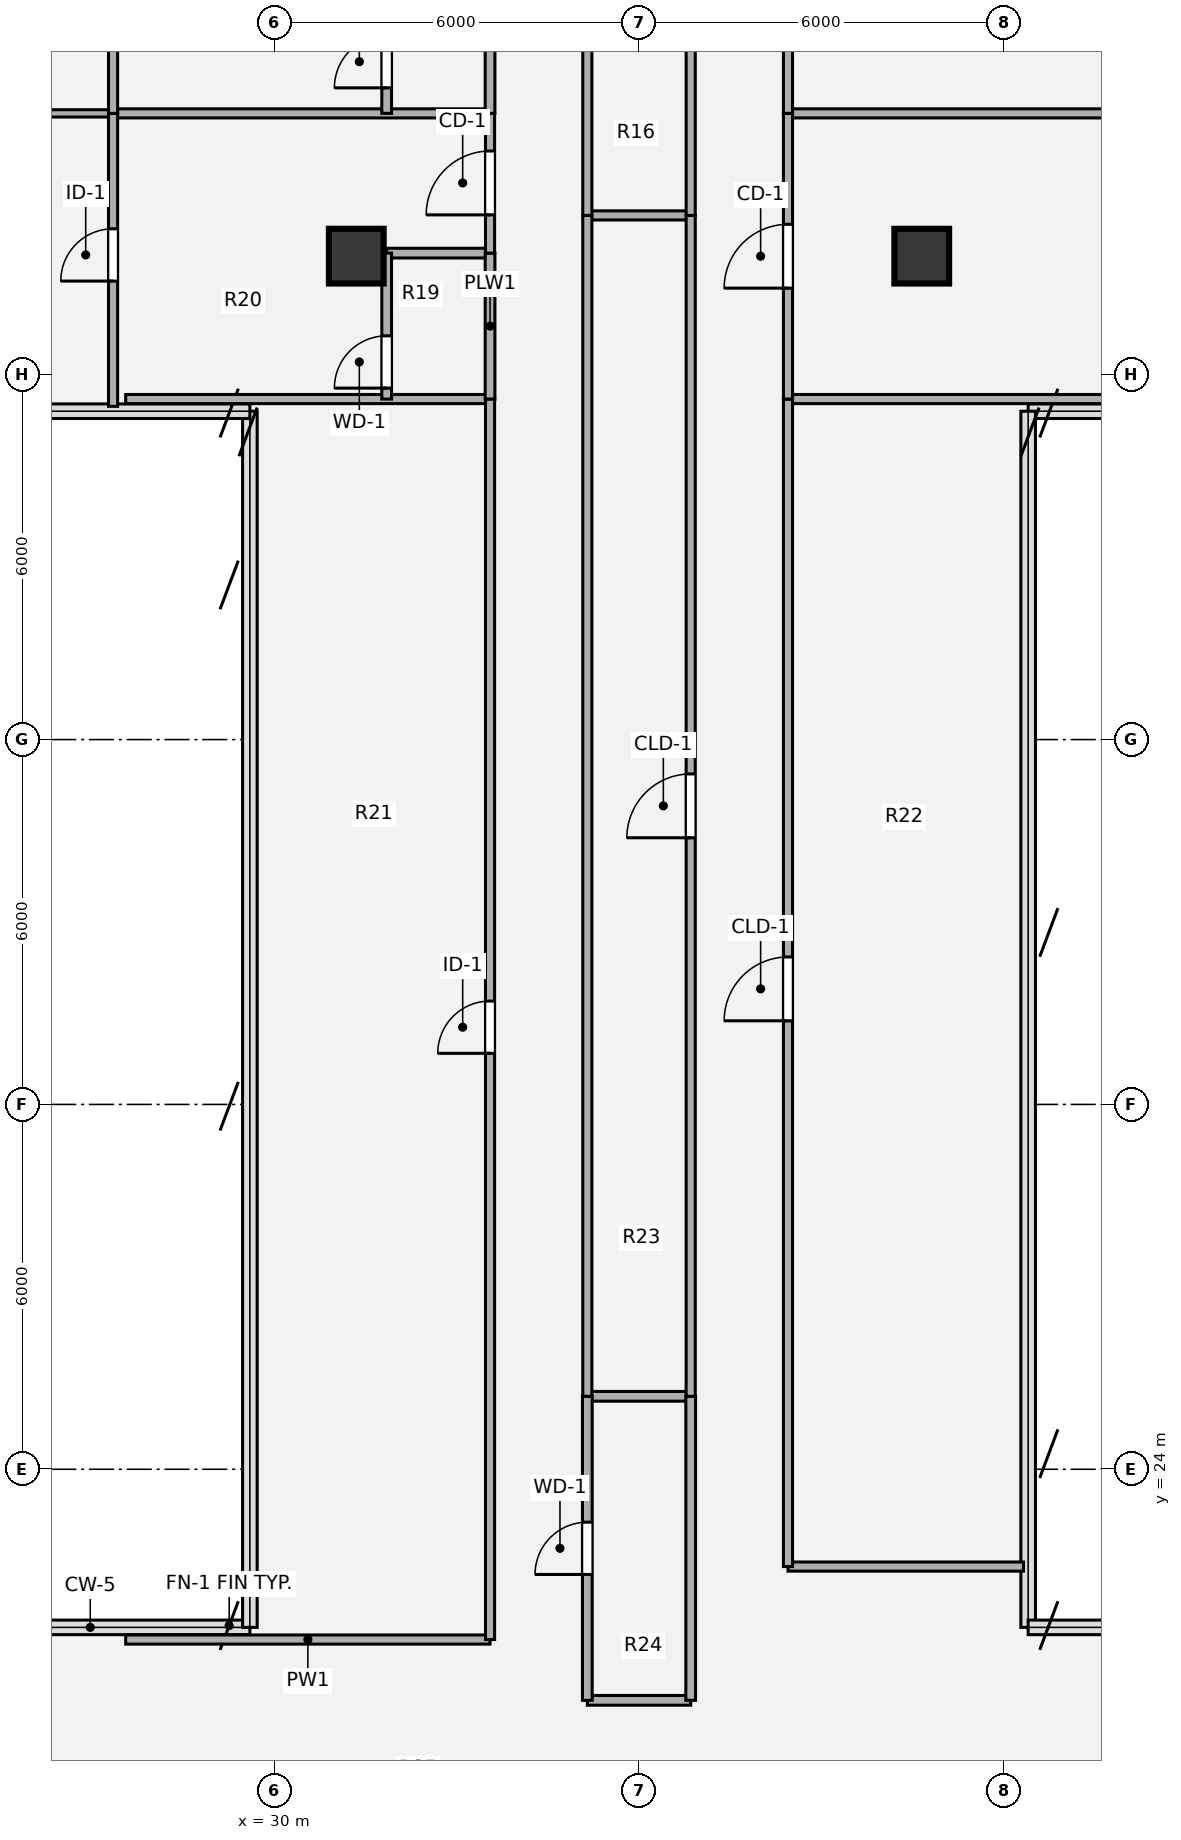
"""IFC4 building model, lengths in metres.
Left out: names, types, materials, properties, quantities, classifications, styles, units other than length and angle.
Written with IfcOpenShell. Run it as: python <this file> out.ifc"""

import sys

from ifc_helpers import new_model, si_unit, direction, frame, frame_2d, origin, origin_2d, place, context, subcontext, project, spatial, rectangle, hollow_circle, extrude, source, transform, mapped, element, fill, save


model = new_model("IFC4")
c1 = context("Model", 3, precision=1e-05, world=origin(), true_north=direction((0.0, 1.0)))
c2 = subcontext(c1, "Body", "Model", "MODEL_VIEW")
j1 = project(units=[si_unit("LENGTHUNIT", "METRE"), si_unit("PLANEANGLEUNIT", "RADIAN")], contexts=[c1])
p1 = place(None, origin())
s1 = spatial("IfcSite", under=j1, at=p1, CompositionType="ELEMENT")
p2 = place(p1, origin())
s2 = spatial("IfcBuilding", under=s1, at=p2, CompositionType="ELEMENT")
p3 = place(p2, frame((0.0, 0.0, 264.6)))
s3 = spatial("IfcBuildingStorey", under=s2, at=p3, CompositionType="ELEMENT", Elevation=264.6)
m1 = source(origin(), c2, "Body", "SweptSolid", [
    extrude(hollow_circle(Radius=0.45, WallThickness=0.032, at=origin_2d()), origin(), (0.0, 0.0, 1.0), 3.78),
])
for number, where, z_axis, x_axis in (
    (1, (31.35, 43.95, 0.0), (0.0, 0.0, 1.0), (1.0, 0.0, 0.0)),
    (2, (40.65, 43.95, 0.0), (0.0, 0.0, 1.0), (1.0, 0.0, 0.0)),
):
    element("IfcColumn", number, at=place(p3, frame(where, z_axis=z_axis, x_axis=x_axis)), inside=s3, PredefinedType="COLUMN", context=c2, shape_type="MappedRepresentation", body=[
        mapped(m1, transform((0.0, 0.0, 0.0), x_axis=(1.0, 0.0, 0.0), y_axis=(0.0, 1.0, 0.0), z_axis=(0.0, 0.0, 1.0), scale=1.0)),
    ])
p4 = place(p3, frame((35.15, 20.2, 0.0), z_axis=(0.0, 0.0, 1.0), x_axis=(1.0, 0.0, 0.0)))
e3 = element("IfcWall", 3, at=p4, inside=s3, PredefinedType="PLUMBINGWALL", context=c2, shape_type="SweptSolid", body=[
    extrude(rectangle(XDim=1.7, YDim=0.16, at=frame_2d((0.85, 0.0))), origin(), (0.0, 0.0, 1.0), 3.5),
])
p5 = place(p3, frame((27.558, 21.2, 0.0), z_axis=(0.0, 0.0, 1.0), x_axis=(1.0, 0.0, 0.0)))
e4 = element("IfcWall", 4, at=p5, inside=s3, PredefinedType="PARTITIONING", context=c2, shape_type="SweptSolid", body=[
    extrude(rectangle(XDim=5.992, YDim=0.15, at=frame_2d((2.996, 0.0))), origin(), (0.0, 0.0, 1.0), 3.5),
])
p6 = place(p3, frame((38.45, 22.4, 0.0), z_axis=(0.0, 0.0, 1.0), x_axis=(1.0, 0.0, 0.0)))
e5 = element("IfcWall", 5, at=p6, inside=s3, PredefinedType="PARTITIONING", context=c2, shape_type="SweptSolid", body=[
    extrude(rectangle(XDim=3.873, YDim=0.15, at=frame_2d((1.937, 0.0))), origin(), (0.0, 0.0, 1.0), 3.5),
])
p7 = place(p3, frame((35.15, 25.2, 0.0), z_axis=(0.0, 0.0, 1.0), x_axis=(1.0, 0.0, 0.0)))
e6 = element("IfcWall", 6, at=p7, inside=s3, PredefinedType="PLUMBINGWALL", context=c2, shape_type="SweptSolid", body=[
    extrude(rectangle(XDim=1.7, YDim=0.16, at=frame_2d((0.85, 0.0))), origin(), (0.0, 0.0, 1.0), 3.5),
])
p8 = place(p3, frame((27.558, 41.6, 0.0), z_axis=(0.0, 0.0, 1.0), x_axis=(1.0, 0.0, 0.0)))
e7 = element("IfcWall", 7, at=p8, inside=s3, PredefinedType="PARTITIONING", context=c2, shape_type="SweptSolid", body=[
    extrude(rectangle(XDim=5.992, YDim=0.15, at=frame_2d((2.996, 0.0))), origin(), (0.0, 0.0, 1.0), 3.5),
])
p9 = place(p3, frame((38.45, 41.6, 0.0), z_axis=(0.0, 0.0, 1.0), x_axis=(1.0, 0.0, 0.0)))
e8 = element("IfcWall", 8, at=p9, inside=s3, PredefinedType="PARTITIONING", context=c2, shape_type="SweptSolid", body=[
    extrude(rectangle(XDim=5.993, YDim=0.15, at=frame_2d((2.997, 0.0))), origin(), (0.0, 0.0, 1.0), 3.5),
])
p10 = place(p3, frame((31.85, 44.0, 0.0), z_axis=(0.0, 0.0, 1.0), x_axis=(1.0, 0.0, 0.0)))
e9 = element("IfcWall", 9, at=p10, inside=s3, PredefinedType="PLUMBINGWALL", context=c2, shape_type="SweptSolid", body=[
    extrude(rectangle(XDim=1.7, YDim=0.16, at=frame_2d((0.85, 0.0))), origin(), (0.0, 0.0, 1.0), 2.903),
])
p11 = place(p3, frame((35.15, 44.62, 0.0), z_axis=(0.0, 0.0, 1.0), x_axis=(1.0, 0.0, 0.0)))
e10 = element("IfcWall", 10, at=p11, inside=s3, PredefinedType="PARTITIONING", context=c2, shape_type="SweptSolid", body=[
    extrude(rectangle(XDim=1.7, YDim=0.15, at=frame_2d((0.85, 0.0))), origin(), (0.0, 0.0, 1.0), 3.259),
])
p12 = place(p3, frame((17.78, 46.298, 0.0), z_axis=(0.0, 0.0, 1.0), x_axis=(1.0, 0.0, 0.0)))
e11 = element("IfcWall", 11, at=p12, inside=s3, PredefinedType="PARTITIONING", context=c2, shape_type="SweptSolid", body=[
    extrude(rectangle(XDim=9.57, YDim=0.12, at=frame_2d((4.785, 0.0))), origin(), (0.0, 0.0, 1.0), 3.055),
])
p13 = place(p3, frame((27.35, 46.298, 0.0), z_axis=(0.0, 0.0, 1.0), x_axis=(1.0, 0.0, 0.0)))
e12 = element("IfcWall", 12, at=p13, inside=s3, PredefinedType="PARTITIONING", context=c2, shape_type="SweptSolid", body=[
    extrude(rectangle(XDim=6.2, YDim=0.15, at=frame_2d((3.1, 0.0))), origin(), (0.0, 0.0, 1.0), 3.055),
])
p14 = place(p3, frame((38.45, 46.298, 0.0), z_axis=(0.0, 0.0, 1.0), x_axis=(1.0, 0.0, 0.0)))
e13 = element("IfcWall", 13, at=p14, inside=s3, PredefinedType="PARTITIONING", context=c2, shape_type="SweptSolid", body=[
    extrude(rectangle(XDim=15.77, YDim=0.15, at=frame_2d((7.885, 0.0))), origin(), (0.0, 0.0, 1.0), 3.055),
])
p15 = place(p3, frame((27.35, 41.48, 0.0), z_axis=(0.0, 0.0, 1.0), x_axis=(0.0, 1.0, 0.0)))
e14 = element("IfcWall", 14, at=p15, inside=s3, PredefinedType="PARTITIONING", context=c2, shape_type="SweptSolid", body=[
    extrude(rectangle(XDim=4.818, YDim=0.15, at=frame_2d((2.409, 0.0))), origin(), (0.0, 0.0, 1.0), 3.5),
])
p16 = place(p15, frame((2.06, 0.0, 0.0)))
e15 = element("IfcOpeningElement", 15, at=p16, cuts=e14, PredefinedType="OPENING", context=c2, shape_type="SweptSolid", body=[
    extrude(rectangle(XDim=0.86, YDim=2.1, at=origin_2d()), frame((0.43, 0.085, 1.05), z_axis=(0.0, -1.0, 0.0), x_axis=(1.0, 0.0, 0.0)), (0.0, 0.0, 1.0), 0.17),
])
p17 = place(p3, frame((27.35, 46.298, 0.0), z_axis=(0.0, 0.0, 1.0), x_axis=(0.0, 1.0, 0.0)))
e16 = element("IfcWall", 16, at=p17, inside=s3, PredefinedType="PARTITIONING", context=c2, shape_type="SweptSolid", body=[
    extrude(rectangle(XDim=4.524, YDim=0.15, at=frame_2d((2.262, 0.0))), origin(), (0.0, 0.0, 1.0), 3.5),
])
p18 = place(p17, frame((1.742, 0.0, 0.0)))
e17 = element("IfcOpeningElement", 17, at=p18, cuts=e16, PredefinedType="OPENING", context=c2, shape_type="SweptSolid", body=[
    extrude(rectangle(XDim=0.86, YDim=2.1, at=origin_2d()), frame((0.43, 0.085, 1.05), z_axis=(0.0, -1.0, 0.0), x_axis=(1.0, 0.0, 0.0)), (0.0, 0.0, 1.0), 0.17),
])
p19 = place(p3, frame((31.85, 41.6, 0.0), z_axis=(0.0, 0.0, 1.0), x_axis=(0.0, 1.0, 0.0)))
e18 = element("IfcWall", 18, at=p19, inside=s3, PredefinedType="PLUMBINGWALL", context=c2, shape_type="SweptSolid", body=[
    extrude(rectangle(XDim=2.4, YDim=0.16, at=frame_2d((1.2, 0.0))), origin(), (0.0, 0.0, 1.0), 3.5),
])
p20 = place(p19, frame((0.18, 0.0, 0.0)))
e19 = element("IfcOpeningElement", 19, at=p20, cuts=e18, PredefinedType="OPENING", context=c2, shape_type="SweptSolid", body=[
    extrude(rectangle(XDim=0.86, YDim=2.1, at=origin_2d()), frame((0.43, 0.09, 1.05), z_axis=(0.0, -1.0, 0.0), x_axis=(1.0, 0.0, 0.0)), (0.0, 0.0, 1.0), 0.18),
])
p21 = place(p3, frame((31.85, 46.298, 0.0), z_axis=(0.0, 0.0, 1.0), x_axis=(0.0, 1.0, 0.0)))
e20 = element("IfcWall", 20, at=p21, inside=s3, PredefinedType="PLUMBINGWALL", context=c2, shape_type="SweptSolid", body=[
    extrude(rectangle(XDim=2.4, YDim=0.16, at=frame_2d((1.2, 0.0))), origin(), (0.0, 0.0, 1.0), 3.5),
])
p22 = place(p21, frame((0.42, 0.0, 0.0)))
e21 = element("IfcOpeningElement", 21, at=p22, cuts=e20, PredefinedType="OPENING", context=c2, shape_type="SweptSolid", body=[
    extrude(rectangle(XDim=0.86, YDim=2.1, at=origin_2d()), frame((0.43, 0.09, 1.05), z_axis=(0.0, -1.0, 0.0), x_axis=(1.0, 0.0, 0.0)), (0.0, 0.0, 1.0), 0.18),
])
p23 = place(p3, frame((33.55, 21.2, 0.0), z_axis=(0.0, 0.0, 1.0), x_axis=(0.0, 1.0, 0.0)))
e22 = element("IfcWall", 22, at=p23, inside=s3, PredefinedType="PARTITIONING", context=c2, shape_type="SweptSolid", body=[
    extrude(rectangle(XDim=20.4, YDim=0.15, at=frame_2d((10.2, 0.0))), origin(), (0.0, 0.0, 1.0), 3.5),
])
p24 = place(p23, frame((9.64, 0.0, 0.0)))
e23 = element("IfcOpeningElement", 23, at=p24, cuts=e22, PredefinedType="OPENING", context=c2, shape_type="SweptSolid", body=[
    extrude(rectangle(XDim=0.86, YDim=2.1, at=origin_2d()), frame((0.43, 0.085, 1.05), z_axis=(0.0, -1.0, 0.0), x_axis=(1.0, 0.0, 0.0)), (0.0, 0.0, 1.0), 0.17),
])
p25 = place(p3, frame((33.55, 41.6, 0.0), z_axis=(0.0, 0.0, 1.0), x_axis=(0.0, 1.0, 0.0)))
e24 = element("IfcWall", 24, at=p25, inside=s3, PredefinedType="PLUMBINGWALL", context=c2, shape_type="SweptSolid", body=[
    extrude(rectangle(XDim=2.4, YDim=0.16, at=frame_2d((1.2, 0.0))), origin(), (0.0, 0.0, 1.0), 3.5),
])
p26 = place(p3, frame((33.55, 44.0, 0.0), z_axis=(0.0, 0.0, 1.0), x_axis=(0.0, 1.0, 0.0)))
e25 = element("IfcWall", 25, at=p26, inside=s3, PredefinedType="PARTITIONING", context=c2, shape_type="SweptSolid", body=[
    extrude(rectangle(XDim=2.298, YDim=0.15, at=frame_2d((1.149, 0.0))), origin(), (0.0, 0.0, 1.0), 3.5),
])
p27 = place(p26, frame((0.629, 0.0, 0.0)))
e26 = element("IfcOpeningElement", 26, at=p27, cuts=e25, PredefinedType="OPENING", context=c2, shape_type="SweptSolid", body=[
    extrude(rectangle(XDim=1.05, YDim=2.1, at=origin_2d()), frame((0.525, 0.085, 1.05), z_axis=(0.0, -1.0, 0.0), x_axis=(1.0, 0.0, 0.0)), (0.0, 0.0, 1.0), 0.17),
])
p28 = place(p3, frame((33.55, 46.298, 0.0), z_axis=(0.0, 0.0, 1.0), x_axis=(0.0, 1.0, 0.0)))
e27 = element("IfcWall", 27, at=p28, inside=s3, PredefinedType="PLUMBINGWALL", context=c2, shape_type="SweptSolid", body=[
    extrude(rectangle(XDim=2.4, YDim=0.16, at=frame_2d((1.2, 0.0))), origin(), (0.0, 0.0, 1.0), 3.5),
])
p29 = place(p3, frame((35.15, 20.2, 0.0), z_axis=(0.0, 0.0, 1.0), x_axis=(0.0, 1.0, 0.0)))
e28 = element("IfcWall", 28, at=p29, inside=s3, PredefinedType="PLUMBINGWALL", context=c2, shape_type="SweptSolid", body=[
    extrude(rectangle(XDim=5.0, YDim=0.16, at=frame_2d((2.5, 0.0))), origin(), (0.0, 0.0, 1.0), 3.5),
])
p30 = place(p29, frame((2.07, 0.0, 0.0)))
e29 = element("IfcOpeningElement", 29, at=p30, cuts=e28, PredefinedType="OPENING", context=c2, shape_type="SweptSolid", body=[
    extrude(rectangle(XDim=0.86, YDim=2.1, at=origin_2d()), frame((0.43, 0.09, 1.05), z_axis=(0.0, -1.0, 0.0), x_axis=(1.0, 0.0, 0.0)), (0.0, 0.0, 1.0), 0.18),
])
p31 = place(p3, frame((35.15, 25.2, 0.0), z_axis=(0.0, 0.0, 1.0), x_axis=(0.0, 1.0, 0.0)))
e30 = element("IfcWall", 30, at=p31, inside=s3, PredefinedType="PARTITIONING", context=c2, shape_type="SweptSolid", body=[
    extrude(rectangle(XDim=19.42, YDim=0.15, at=frame_2d((9.71, 0.0))), origin(), (0.0, 0.0, 1.0), 3.5),
])
p32 = place(p3, frame((35.15, 44.62, 0.0), z_axis=(0.0, 0.0, 1.0), x_axis=(0.0, 1.0, 0.0)))
e31 = element("IfcWall", 31, at=p32, inside=s3, PredefinedType="PARTITIONING", context=c2, shape_type="SweptSolid", body=[
    extrude(rectangle(XDim=12.58, YDim=0.15, at=frame_2d((6.29, 0.0))), origin(), (0.0, 0.0, 1.0), 3.5),
])
p33 = place(p32, frame((5.83, 0.0, 0.0)))
e32 = element("IfcOpeningElement", 32, at=p33, cuts=e31, PredefinedType="OPENING", context=c2, shape_type="SweptSolid", body=[
    extrude(rectangle(XDim=0.86, YDim=2.1, at=origin_2d()), frame((0.43, 0.085, 1.05), z_axis=(0.0, -1.0, 0.0), x_axis=(1.0, 0.0, 0.0)), (0.0, 0.0, 1.0), 0.17),
])
p34 = place(p3, frame((36.85, 20.2, 0.0), z_axis=(0.0, 0.0, 1.0), x_axis=(0.0, 1.0, 0.0)))
e33 = element("IfcWall", 33, at=p34, inside=s3, PredefinedType="PLUMBINGWALL", context=c2, shape_type="SweptSolid", body=[
    extrude(rectangle(XDim=5.0, YDim=0.16, at=frame_2d((2.5, 0.0))), origin(), (0.0, 0.0, 1.0), 3.5),
])
p35 = place(p3, frame((36.85, 25.2, 0.0), z_axis=(0.0, 0.0, 1.0), x_axis=(0.0, 1.0, 0.0)))
e34 = element("IfcWall", 34, at=p35, inside=s3, PredefinedType="PARTITIONING", context=c2, shape_type="SweptSolid", body=[
    extrude(rectangle(XDim=19.42, YDim=0.15, at=frame_2d((9.71, 0.0))), origin(), (0.0, 0.0, 1.0), 3.5),
])
p36 = place(p35, frame((9.185, 0.0, 0.0)))
e35 = element("IfcOpeningElement", 35, at=p36, cuts=e34, PredefinedType="OPENING", context=c2, shape_type="SweptSolid", body=[
    extrude(rectangle(XDim=1.05, YDim=2.1, at=origin_2d()), frame((0.525, 0.085, 1.05), z_axis=(0.0, -1.0, 0.0), x_axis=(1.0, 0.0, 0.0)), (0.0, 0.0, 1.0), 0.17),
])
p37 = place(p3, frame((36.85, 44.62, 0.0), z_axis=(0.0, 0.0, 1.0), x_axis=(0.0, 1.0, 0.0)))
e36 = element("IfcWall", 36, at=p37, inside=s3, PredefinedType="PARTITIONING", context=c2, shape_type="SweptSolid", body=[
    extrude(rectangle(XDim=12.58, YDim=0.15, at=frame_2d((6.29, 0.0))), origin(), (0.0, 0.0, 1.0), 3.5),
])
p38 = place(p3, frame((38.45, 22.4, 0.0), z_axis=(0.0, 0.0, 1.0), x_axis=(0.0, 1.0, 0.0)))
e37 = element("IfcWall", 37, at=p38, inside=s3, PredefinedType="PARTITIONING", context=c2, shape_type="SweptSolid", body=[
    extrude(rectangle(XDim=19.2, YDim=0.15, at=frame_2d((9.6, 0.0))), origin(), (0.0, 0.0, 1.0), 3.5),
])
p39 = place(p38, frame((8.975, 0.0, 0.0)))
e38 = element("IfcOpeningElement", 38, at=p39, cuts=e37, PredefinedType="OPENING", context=c2, shape_type="SweptSolid", body=[
    extrude(rectangle(XDim=1.05, YDim=2.1, at=origin_2d()), frame((0.525, 0.085, 1.05), z_axis=(0.0, -1.0, 0.0), x_axis=(1.0, 0.0, 0.0)), (0.0, 0.0, 1.0), 0.17),
])
p40 = place(p3, frame((38.45, 41.6, 0.0), z_axis=(0.0, 0.0, 1.0), x_axis=(0.0, 1.0, 0.0)))
e39 = element("IfcWall", 39, at=p40, inside=s3, PredefinedType="PARTITIONING", context=c2, shape_type="SweptSolid", body=[
    extrude(rectangle(XDim=4.698, YDim=0.15, at=frame_2d((2.349, 0.0))), origin(), (0.0, 0.0, 1.0), 3.5),
])
p41 = place(p40, frame((1.824, 0.0, 0.0)))
e40 = element("IfcOpeningElement", 40, at=p41, cuts=e39, PredefinedType="OPENING", context=c2, shape_type="SweptSolid", body=[
    extrude(rectangle(XDim=1.05, YDim=2.1, at=origin_2d()), frame((0.525, 0.085, 1.05), z_axis=(0.0, -1.0, 0.0), x_axis=(1.0, 0.0, 0.0)), (0.0, 0.0, 1.0), 0.17),
])
p42 = place(p3, frame((38.45, 46.298, 0.0), z_axis=(0.0, 0.0, 1.0), x_axis=(0.0, 1.0, 0.0)))
e41 = element("IfcWall", 41, at=p42, inside=s3, PredefinedType="PARTITIONING", context=c2, shape_type="SweptSolid", body=[
    extrude(rectangle(XDim=4.524, YDim=0.15, at=frame_2d((2.262, 0.0))), origin(), (0.0, 0.0, 1.0), 3.5),
])
p43 = place(p42, frame((1.737, 0.0, 0.0)))
e42 = element("IfcOpeningElement", 42, at=p43, cuts=e41, PredefinedType="OPENING", context=c2, shape_type="SweptSolid", body=[
    extrude(rectangle(XDim=1.05, YDim=2.1, at=origin_2d()), frame((0.525, 0.085, 1.05), z_axis=(0.0, -1.0, 0.0), x_axis=(1.0, 0.0, 0.0)), (0.0, 0.0, 1.0), 0.17),
])
m2 = source(origin(), c2, "Body", "SweptSolid", [
    extrude(rectangle(XDim=0.86, YDim=2.1, at=origin_2d()), frame((0.43, 0.025, 1.05), z_axis=(0.0, -1.0, 0.0), x_axis=(1.0, 0.0, 0.0)), (0.0, 0.0, 1.0), 0.05),
])
p44 = place(p16, origin())
e43 = element("IfcDoor", 43, at=p44, inside=s3, OperationType="SINGLE_SWING_LEFT", PredefinedType="DOOR", context=c2, shape_type="MappedRepresentation", body=[
    mapped(m2, transform((0.0, 0.0, 0.0), x_axis=(1.0, 0.0, 0.0), y_axis=(0.0, 1.0, 0.0), z_axis=(0.0, 0.0, 1.0), scale=1.0)),
])
fill(e15, e43)
m3 = source(origin(), c2, "Body", "SweptSolid", [
    extrude(rectangle(XDim=0.86, YDim=2.1, at=origin_2d()), frame((0.43, 0.025, 1.05), z_axis=(0.0, -1.0, 0.0), x_axis=(1.0, 0.0, 0.0)), (0.0, 0.0, 1.0), 0.05),
])
p45 = place(p20, origin())
e44 = element("IfcDoor", 44, at=p45, inside=s3, OperationType="SINGLE_SWING_LEFT", PredefinedType="DOOR", context=c2, shape_type="MappedRepresentation", body=[
    mapped(m3, transform((0.0, 0.0, 0.0), x_axis=(1.0, 0.0, 0.0), y_axis=(0.0, 1.0, 0.0), z_axis=(0.0, 0.0, 1.0), scale=1.0)),
])
fill(e19, e44)
p46 = place(p22, origin())
e45 = element("IfcDoor", 45, at=p46, inside=s3, OperationType="SINGLE_SWING_LEFT", PredefinedType="DOOR", context=c2, shape_type="MappedRepresentation", body=[
    mapped(m3, transform((0.0, 0.0, 0.0), x_axis=(1.0, 0.0, 0.0), y_axis=(0.0, 1.0, 0.0), z_axis=(0.0, 0.0, 1.0), scale=1.0)),
])
fill(e21, e45)
p47 = place(p24, origin())
e46 = element("IfcDoor", 46, at=p47, inside=s3, OperationType="SINGLE_SWING_LEFT", PredefinedType="DOOR", context=c2, shape_type="MappedRepresentation", body=[
    mapped(m2, transform((0.0, 0.0, 0.0), x_axis=(1.0, 0.0, 0.0), y_axis=(0.0, 1.0, 0.0), z_axis=(0.0, 0.0, 1.0), scale=1.0)),
])
fill(e23, e46)
m4 = source(origin(), c2, "Body", "SweptSolid", [
    extrude(rectangle(XDim=1.05, YDim=2.1, at=origin_2d()), frame((0.525, 0.025, 1.05), z_axis=(0.0, -1.0, 0.0), x_axis=(1.0, 0.0, 0.0)), (0.0, 0.0, 1.0), 0.05),
])
p48 = place(p27, origin())
e47 = element("IfcDoor", 47, at=p48, inside=s3, OperationType="SINGLE_SWING_LEFT", PredefinedType="DOOR", context=c2, shape_type="MappedRepresentation", body=[
    mapped(m4, transform((0.0, 0.0, 0.0), x_axis=(1.0, 0.0, 0.0), y_axis=(0.0, 1.0, 0.0), z_axis=(0.0, 0.0, 1.0), scale=1.0)),
])
fill(e26, e47)
p49 = place(p30, origin())
e48 = element("IfcDoor", 48, at=p49, inside=s3, OperationType="SINGLE_SWING_LEFT", PredefinedType="DOOR", context=c2, shape_type="MappedRepresentation", body=[
    mapped(m3, transform((0.0, 0.0, 0.0), x_axis=(1.0, 0.0, 0.0), y_axis=(0.0, 1.0, 0.0), z_axis=(0.0, 0.0, 1.0), scale=1.0)),
])
fill(e29, e48)
m5 = source(origin(), c2, "Body", "SweptSolid", [
    extrude(rectangle(XDim=1.05, YDim=2.1, at=origin_2d()), frame((0.525, 0.025, 1.05), z_axis=(0.0, -1.0, 0.0), x_axis=(1.0, 0.0, 0.0)), (0.0, 0.0, 1.0), 0.05),
])
p50 = place(p36, origin())
e49 = element("IfcDoor", 49, at=p50, inside=s3, OperationType="SINGLE_SWING_LEFT", PredefinedType="DOOR", context=c2, shape_type="MappedRepresentation", body=[
    mapped(m5, transform((0.0, 0.0, 0.0), x_axis=(1.0, 0.0, 0.0), y_axis=(0.0, 1.0, 0.0), z_axis=(0.0, 0.0, 1.0), scale=1.0)),
])
fill(e35, e49)
p51 = place(p39, origin())
e50 = element("IfcDoor", 50, at=p51, inside=s3, OperationType="SINGLE_SWING_LEFT", PredefinedType="DOOR", context=c2, shape_type="MappedRepresentation", body=[
    mapped(m5, transform((0.0, 0.0, 0.0), x_axis=(1.0, 0.0, 0.0), y_axis=(0.0, 1.0, 0.0), z_axis=(0.0, 0.0, 1.0), scale=1.0)),
])
fill(e38, e50)
p52 = place(p41, origin())
e51 = element("IfcDoor", 51, at=p52, inside=s3, OperationType="SINGLE_SWING_LEFT", PredefinedType="DOOR", context=c2, shape_type="MappedRepresentation", body=[
    mapped(m4, transform((0.0, 0.0, 0.0), x_axis=(1.0, 0.0, 0.0), y_axis=(0.0, 1.0, 0.0), z_axis=(0.0, 0.0, 1.0), scale=1.0)),
])
fill(e40, e51)
save(model, sys.argv[1])
